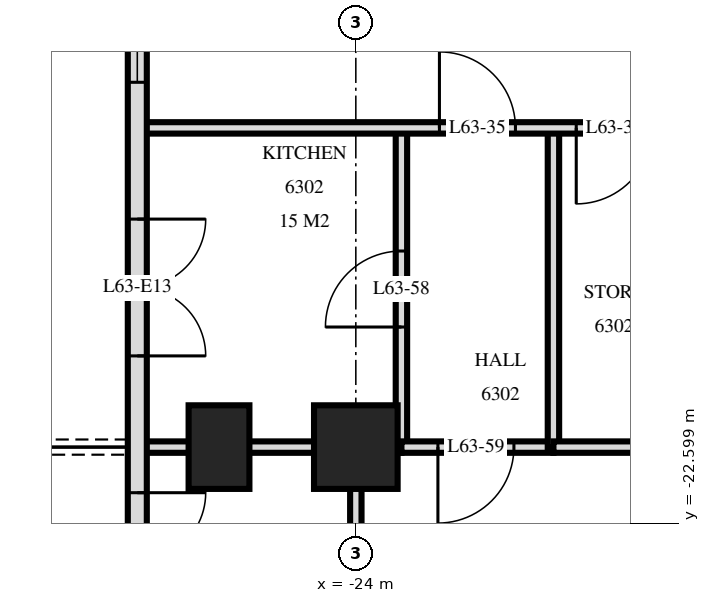
"""IFC4 building model, lengths in metres.
Left out: names, types, materials, properties, quantities, classifications, styles, units other than length and angle.
Written with IfcOpenShell. Run it as: python <this file> out.ifc"""

import sys

from ifc_helpers import new_model, si_unit, direction, frame, frame_2d, origin, origin_2d, place, context, subcontext, project, spatial, rectangle, extrude, element, fill, save


model = new_model("IFC4")
c1 = context("Model", 3, precision=1e-05, world=origin(), true_north=direction((0.0, 1.0)))
c2 = subcontext(c1, "Body", "Model", "MODEL_VIEW")
j1 = project(units=[si_unit("LENGTHUNIT", "METRE"), si_unit("PLANEANGLEUNIT", "RADIAN")], contexts=[c1])
p1 = place(None, origin())
s1 = spatial("IfcSite", under=j1, at=p1, CompositionType="ELEMENT")
p2 = place(p1, origin())
s2 = spatial("IfcBuilding", under=s1, at=p2, CompositionType="ELEMENT")
p3 = place(p2, frame((0.0, 0.0, 239.6)))
s3 = spatial("IfcBuildingStorey", under=s2, at=p3, CompositionType="ELEMENT", Elevation=239.6)
p4 = place(p3, frame((-25.8, -21.6, 0.0), z_axis=(0.0, 0.0, 1.0), x_axis=(0.0, 1.0, 0.0)))
e1 = element("IfcColumn", 1, at=p4, inside=s3, PredefinedType="COLUMN", context=c2, shape_type="SweptSolid", body=[
    extrude(rectangle(XDim=1.1, YDim=0.8, at=origin_2d()), origin(), (0.0, 0.0, 1.0), 3.5),
])
p5 = place(p3, frame((-24.0, -21.6, 0.0), z_axis=(0.0, 0.0, 1.0), x_axis=(1.0, 0.0, 0.0)))
e2 = element("IfcColumn", 2, at=p5, inside=s3, PredefinedType="COLUMN", context=c2, shape_type="SweptSolid", body=[
    extrude(rectangle(XDim=1.1, YDim=1.1, at=origin_2d()), origin(), (0.0, 0.0, 1.0), 3.5),
])
p6 = place(p3, frame((-26.875, -3.325, 0.0), z_axis=(0.0, 0.0, 1.0), x_axis=(0.0, -1.0, 0.0)))
e3 = element("IfcWall", 3, at=p6, inside=s3, PredefinedType="SOLIDWALL", context=c2, shape_type="SweptSolid", body=[
    extrude(rectangle(XDim=21.551, YDim=0.25, at=frame_2d((10.775, 0.0))), origin(), (0.0, 0.0, 1.0), 3.22),
])
p7 = place(p6, frame((7.525, 0.0, 0.0)))
e4 = element("IfcOpeningElement", 4, at=p7, cuts=e3, PredefinedType="OPENING", context=c2, shape_type="SweptSolid", body=[
    extrude(rectangle(XDim=1.8, YDim=2.4, at=frame_2d((0.9, 1.2))), frame((0.0, 0.135, 0.0), z_axis=(0.0, -1.0, 0.0), x_axis=(1.0, 0.0, 0.0)), (0.0, 0.0, 1.0), 0.27),
])
p8 = place(p6, frame((12.275, 0.0, 0.9)))
e5 = element("IfcOpeningElement", 5, at=p8, cuts=e3, PredefinedType="OPENING", context=c2, shape_type="SweptSolid", body=[
    extrude(rectangle(XDim=1.2, YDim=1.5, at=frame_2d((0.6, 0.75))), frame((0.0, 0.135, 0.0), z_axis=(0.0, -1.0, 0.0), x_axis=(1.0, 0.0, 0.0)), (0.0, 0.0, 1.0), 0.27),
])
p9 = place(p6, frame((15.275, 0.0, 0.0)))
e6 = element("IfcOpeningElement", 6, at=p9, cuts=e3, PredefinedType="OPENING", context=c2, shape_type="SweptSolid", body=[
    extrude(rectangle(XDim=1.8, YDim=2.4, at=frame_2d((0.9, 1.2))), frame((0.0, 0.135, 0.0), z_axis=(0.0, -1.0, 0.0), x_axis=(1.0, 0.0, 0.0)), (0.0, 0.0, 1.0), 0.27),
])
p10 = place(p6, frame((18.875, 0.0, 0.0)))
e7 = element("IfcOpeningElement", 7, at=p10, cuts=e3, PredefinedType="OPENING", context=c2, shape_type="SweptSolid", body=[
    extrude(rectangle(XDim=1.8, YDim=2.4, at=frame_2d((0.9, 1.2))), frame((0.0, 0.135, 0.0), z_axis=(0.0, -1.0, 0.0), x_axis=(1.0, 0.0, 0.0)), (0.0, 0.0, 1.0), 0.27),
])
p11 = place(p3, frame((-21.4, -21.6, 0.0), z_axis=(0.0, 0.0, 1.0), x_axis=(0.0, 1.0, 0.0)))
e8 = element("IfcWall", 8, at=p11, inside=s3, PredefinedType="PARTITIONING", context=c2, shape_type="SweptSolid", body=[
    extrude(rectangle(XDim=4.2, YDim=0.15, at=frame_2d((2.1, 0.0))), origin(), (0.0, 0.0, 1.0), 3.22),
])
p12 = place(p3, frame((-23.4, -21.6, 0.0), z_axis=(0.0, 0.0, 1.0), x_axis=(0.0, 1.0, 0.0)))
e9 = element("IfcWall", 9, at=p12, inside=s3, PredefinedType="PARTITIONING", context=c2, shape_type="SweptSolid", body=[
    extrude(rectangle(XDim=4.2, YDim=0.15, at=frame_2d((2.1, 0.0))), origin(), (0.0, 0.0, 1.0), 3.22),
])
p13 = place(p12, frame((1.58, 0.0, 0.0)))
e10 = element("IfcOpeningElement", 10, at=p13, cuts=e9, PredefinedType="OPENING", context=c2, shape_type="SweptSolid", body=[
    extrude(rectangle(XDim=1.0, YDim=2.1, at=frame_2d((0.5, 1.05))), frame((0.0, 0.085, 0.0), z_axis=(0.0, -1.0, 0.0), x_axis=(1.0, 0.0, 0.0)), (0.0, 0.0, 1.0), 0.17),
])
p14 = place(p3, frame((-24.0, -28.918, 0.0), z_axis=(0.0, 0.0, 1.0), x_axis=(0.0, 1.0, 0.0)))
e11 = element("IfcWall", 11, at=p14, inside=s3, PredefinedType="PARTITIONING", context=c2, shape_type="SweptSolid", body=[
    extrude(rectangle(XDim=7.318, YDim=0.15, at=frame_2d((3.659, 0.0))), origin(), (0.0, 0.0, 1.0), 3.22),
])
p15 = place(p14, frame((3.136, 0.0, 0.0)))
e12 = element("IfcOpeningElement", 12, at=p15, cuts=e11, PredefinedType="OPENING", context=c2, shape_type="SweptSolid", body=[
    extrude(rectangle(XDim=0.9, YDim=2.1, at=frame_2d((0.45, 1.05))), frame((0.0, 0.085, 0.0), z_axis=(0.0, -1.0, 0.0), x_axis=(1.0, 0.0, 0.0)), (0.0, 0.0, 1.0), 0.17),
])
p16 = place(p3, frame((-23.4, -21.6, 0.0), z_axis=(0.0, 0.0, 1.0), x_axis=(1.0, 0.0, 0.0)))
e13 = element("IfcWall", 13, at=p16, inside=s3, PredefinedType="PARTITIONING", context=c2, shape_type="SweptSolid", body=[
    extrude(rectangle(XDim=2.0, YDim=0.15, at=frame_2d((1.0, 0.0))), origin(), (0.0, 0.0, 1.0), 3.22),
])
p17 = place(p16, frame((0.48, 0.0, 0.0)))
e14 = element("IfcOpeningElement", 14, at=p17, cuts=e13, PredefinedType="OPENING", context=c2, shape_type="SweptSolid", body=[
    extrude(rectangle(XDim=1.0, YDim=2.1, at=frame_2d((0.5, 1.05))), frame((0.0, 0.085, 0.0), z_axis=(0.0, -1.0, 0.0), x_axis=(1.0, 0.0, 0.0)), (0.0, 0.0, 1.0), 0.17),
])
p18 = place(p3, frame((-26.82, -21.6, 0.0), z_axis=(0.0, 0.0, 1.0), x_axis=(1.0, 0.0, 0.0)))
e15 = element("IfcWall", 15, at=p18, inside=s3, PredefinedType="PARTITIONING", context=c2, shape_type="SweptSolid", body=[
    extrude(rectangle(XDim=3.42, YDim=0.15, at=frame_2d((1.71, 0.0))), origin(), (0.0, 0.0, 1.0), 3.22),
])
p19 = place(p3, frame((-21.4, -21.6, 0.0), z_axis=(0.0, 0.0, 1.0), x_axis=(1.0, 0.0, 0.0)))
e16 = element("IfcWall", 16, at=p19, inside=s3, PredefinedType="PARTITIONING", context=c2, shape_type="SweptSolid", body=[
    extrude(rectangle(XDim=6.4, YDim=0.15, at=frame_2d((3.2, 0.0))), origin(), (0.0, 0.0, 1.0), 3.22),
])
p20 = place(p19, frame((4.78, 0.0, 0.0)))
e17 = element("IfcOpeningElement", 17, at=p20, cuts=e16, PredefinedType="OPENING", context=c2, shape_type="SweptSolid", body=[
    extrude(rectangle(XDim=0.8, YDim=2.1, at=frame_2d((0.4, 1.05))), frame((0.0, 0.085, 0.0), z_axis=(0.0, -1.0, 0.0), x_axis=(1.0, 0.0, 0.0)), (0.0, 0.0, 1.0), 0.17),
])
p21 = place(p19, frame((1.95, 0.0, 0.0)))
e18 = element("IfcOpeningElement", 18, at=p21, cuts=e16, PredefinedType="OPENING", context=c2, shape_type="SweptSolid", body=[
    extrude(rectangle(XDim=0.8, YDim=2.1, at=frame_2d((0.4, 1.05))), frame((0.0, 0.085, 0.0), z_axis=(0.0, -1.0, 0.0), x_axis=(1.0, 0.0, 0.0)), (0.0, 0.0, 1.0), 0.17),
])
p22 = place(p3, frame((-26.82, -17.4, 0.0), z_axis=(0.0, 0.0, 1.0), x_axis=(1.0, 0.0, 0.0)))
e19 = element("IfcWall", 19, at=p22, inside=s3, PredefinedType="PARTITIONING", context=c2, shape_type="SweptSolid", body=[
    extrude(rectangle(XDim=53.64, YDim=0.15, at=frame_2d((26.82, 0.0))), origin(), (0.0, 0.0, 1.0), 3.22),
])
p23 = place(p22, frame((11.97, 0.0, 0.0)))
e20 = element("IfcOpeningElement", 20, at=p23, cuts=e19, PredefinedType="OPENING", context=c2, shape_type="SweptSolid", body=[
    extrude(rectangle(XDim=1.0, YDim=2.1, at=frame_2d((0.5, 1.05))), frame((0.0, 0.085, 0.0), z_axis=(0.0, -1.0, 0.0), x_axis=(1.0, 0.0, 0.0)), (0.0, 0.0, 1.0), 0.17),
])
p24 = place(p22, frame((3.92, 0.0, 0.0)))
e21 = element("IfcOpeningElement", 21, at=p24, cuts=e19, PredefinedType="OPENING", context=c2, shape_type="SweptSolid", body=[
    extrude(rectangle(XDim=1.0, YDim=2.1, at=frame_2d((0.5, 1.05))), frame((0.0, 0.085, 0.0), z_axis=(0.0, -1.0, 0.0), x_axis=(1.0, 0.0, 0.0)), (0.0, 0.0, 1.0), 0.17),
])
p25 = place(p22, frame((5.72, 0.0, 0.0)))
e22 = element("IfcOpeningElement", 22, at=p25, cuts=e19, PredefinedType="OPENING", context=c2, shape_type="SweptSolid", body=[
    extrude(rectangle(XDim=1.0, YDim=2.1, at=frame_2d((0.5, 1.05))), frame((0.0, 0.085, 0.0), z_axis=(0.0, -1.0, 0.0), x_axis=(1.0, 0.0, 0.0)), (0.0, 0.0, 1.0), 0.17),
])
p26 = place(p22, frame((47.72, 0.0, 0.0)))
e23 = element("IfcOpeningElement", 23, at=p26, cuts=e19, PredefinedType="OPENING", context=c2, shape_type="SweptSolid", body=[
    extrude(rectangle(XDim=1.0, YDim=2.1, at=frame_2d((0.5, 1.05))), frame((0.0, 0.085, 0.0), z_axis=(0.0, -1.0, 0.0), x_axis=(1.0, 0.0, 0.0)), (0.0, 0.0, 1.0), 0.17),
])
p27 = place(p22, frame((51.02, 0.0, 0.0)))
e24 = element("IfcOpeningElement", 24, at=p27, cuts=e19, PredefinedType="OPENING", context=c2, shape_type="SweptSolid", body=[
    extrude(rectangle(XDim=1.0, YDim=2.1, at=frame_2d((0.5, 1.05))), frame((0.0, 0.085, 0.0), z_axis=(0.0, -1.0, 0.0), x_axis=(1.0, 0.0, 0.0)), (0.0, 0.0, 1.0), 0.17),
])
p28 = place(p22, frame((17.32, 0.0, 0.0)))
e25 = element("IfcOpeningElement", 25, at=p28, cuts=e19, PredefinedType="OPENING", context=c2, shape_type="SweptSolid", body=[
    extrude(rectangle(XDim=1.0, YDim=2.1, at=frame_2d((0.5, 1.05))), frame((0.0, 0.085, 0.0), z_axis=(0.0, -1.0, 0.0), x_axis=(1.0, 0.0, 0.0)), (0.0, 0.0, 1.0), 0.17),
])
p29 = place(p22, frame((23.32, 0.0, 0.0)))
e26 = element("IfcOpeningElement", 26, at=p29, cuts=e19, PredefinedType="OPENING", context=c2, shape_type="SweptSolid", body=[
    extrude(rectangle(XDim=1.0, YDim=2.1, at=frame_2d((0.5, 1.05))), frame((0.0, 0.085, 0.0), z_axis=(0.0, -1.0, 0.0), x_axis=(1.0, 0.0, 0.0)), (0.0, 0.0, 1.0), 0.17),
])
p30 = place(p22, frame((29.32, 0.0, 0.0)))
e27 = element("IfcOpeningElement", 27, at=p30, cuts=e19, PredefinedType="OPENING", context=c2, shape_type="SweptSolid", body=[
    extrude(rectangle(XDim=1.0, YDim=2.1, at=frame_2d((0.5, 1.05))), frame((0.0, 0.085, 0.0), z_axis=(0.0, -1.0, 0.0), x_axis=(1.0, 0.0, 0.0)), (0.0, 0.0, 1.0), 0.17),
])
p31 = place(p22, frame((35.32, 0.0, 0.0)))
e28 = element("IfcOpeningElement", 28, at=p31, cuts=e19, PredefinedType="OPENING", context=c2, shape_type="SweptSolid", body=[
    extrude(rectangle(XDim=1.0, YDim=2.1, at=frame_2d((0.5, 1.05))), frame((0.0, 0.085, 0.0), z_axis=(0.0, -1.0, 0.0), x_axis=(1.0, 0.0, 0.0)), (0.0, 0.0, 1.0), 0.17),
])
p32 = place(p8, origin())
e29 = element("IfcWindow", 29, at=p32, inside=s3, PartitioningType="SINGLE_PANEL", PredefinedType="WINDOW", context=c2, shape_type="SweptSolid", body=[
    extrude(rectangle(XDim=1.2, YDim=1.5, at=frame_2d((0.6, 0.75))), frame((0.0, 0.03, 0.0), z_axis=(0.0, -1.0, 0.0), x_axis=(1.0, 0.0, 0.0)), (0.0, 0.0, 1.0), 0.06),
])
fill(e5, e29)
p33 = place(p9, origin())
e30 = element("IfcDoor", 30, at=p33, inside=s3, OperationType="DOUBLE_DOOR_SINGLE_SWING", PredefinedType="DOOR", context=c2, shape_type="SweptSolid", body=[
    extrude(rectangle(XDim=1.8, YDim=2.4, at=frame_2d((0.9, 1.2))), frame((0.0, 0.025, 0.0), z_axis=(0.0, -1.0, 0.0), x_axis=(1.0, 0.0, 0.0)), (0.0, 0.0, 1.0), 0.05),
])
fill(e6, e30)
p34 = place(p10, origin())
e31 = element("IfcDoor", 31, at=p34, inside=s3, OperationType="DOUBLE_DOOR_SINGLE_SWING", PredefinedType="DOOR", context=c2, shape_type="SweptSolid", body=[
    extrude(rectangle(XDim=1.8, YDim=2.4, at=frame_2d((0.9, 1.2))), frame((0.0, 0.025, 0.0), z_axis=(0.0, -1.0, 0.0), x_axis=(1.0, 0.0, 0.0)), (0.0, 0.0, 1.0), 0.05),
])
fill(e7, e31)
p35 = place(p24, origin())
e32 = element("IfcDoor", 32, at=p35, inside=s3, OperationType="SINGLE_SWING_RIGHT", PredefinedType="DOOR", context=c2, shape_type="SweptSolid", body=[
    extrude(rectangle(XDim=1.0, YDim=2.1, at=frame_2d((0.5, 1.05))), frame((0.0, 0.025, 0.0), z_axis=(0.0, -1.0, 0.0), x_axis=(1.0, 0.0, 0.0)), (0.0, 0.0, 1.0), 0.05),
])
fill(e21, e32)
p36 = place(p25, frame((0.5, 0.0, 0.0), z_axis=(0.0, 0.0, 1.0), x_axis=(-1.0, 0.0, 0.0)))
e33 = element("IfcDoor", 33, at=p36, inside=s3, OperationType="SINGLE_SWING_LEFT", PredefinedType="DOOR", context=c2, shape_type="SweptSolid", body=[
    extrude(rectangle(XDim=1.0, YDim=2.1, at=frame_2d((0.0, 1.05))), frame((0.0, -0.025, 0.0), z_axis=(0.0, 1.0, 0.0), x_axis=(-1.0, 0.0, 0.0)), (0.0, 0.0, 1.0), 0.05),
])
fill(e22, e33)
p37 = place(p13, origin())
e34 = element("IfcDoor", 34, at=p37, inside=s3, OperationType="SINGLE_SWING_RIGHT", PredefinedType="DOOR", context=c2, shape_type="SweptSolid", body=[
    extrude(rectangle(XDim=1.0, YDim=2.1, at=frame_2d((0.5, 1.05))), frame((0.0, 0.025, 0.0), z_axis=(0.0, -1.0, 0.0), x_axis=(1.0, 0.0, 0.0)), (0.0, 0.0, 1.0), 0.05),
])
fill(e10, e34)
p38 = place(p17, frame((0.5, 0.0, 0.0), z_axis=(0.0, 0.0, 1.0), x_axis=(-1.0, 0.0, 0.0)))
e35 = element("IfcDoor", 35, at=p38, inside=s3, OperationType="SINGLE_SWING_LEFT", PredefinedType="DOOR", context=c2, shape_type="SweptSolid", body=[
    extrude(rectangle(XDim=1.0, YDim=2.1, at=frame_2d((0.0, 1.05))), frame((0.0, -0.025, 0.0), z_axis=(0.0, 1.0, 0.0), x_axis=(-1.0, 0.0, 0.0)), (0.0, 0.0, 1.0), 0.05),
])
fill(e14, e35)
save(model, sys.argv[1])
